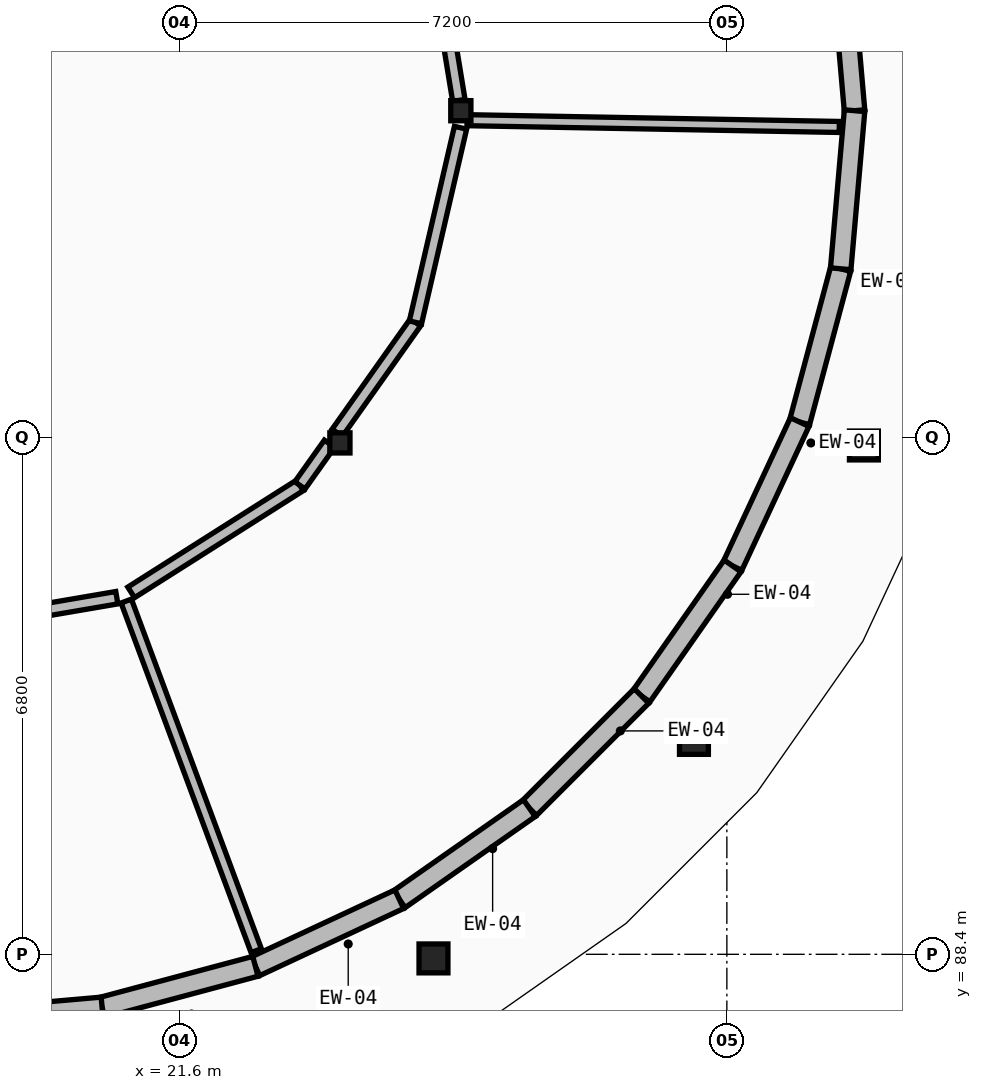
"""IFC4 building model, lengths in metres.
Left out: names, types, materials, properties, quantities, classifications, styles, units other than length and angle.
Written with IfcOpenShell. Run it as: python <this file> out.ifc"""

import sys

from ifc_helpers import new_model, si_unit, direction, frame, frame_2d, origin, origin_2d, place, context, subcontext, project, spatial, rectangle, circle, extrude, element, fill, save


model = new_model("IFC4")
c1 = context("Model", 3, precision=1e-05, world=origin(), true_north=direction((0.0, 1.0)))
c2 = subcontext(c1, "Body", "Model", "MODEL_VIEW")
j1 = project(units=[si_unit("LENGTHUNIT", "METRE"), si_unit("PLANEANGLEUNIT", "RADIAN")], contexts=[c1])
p1 = place(None, origin())
s1 = spatial("IfcSite", under=j1, at=p1, CompositionType="ELEMENT")
p2 = place(p1, origin())
s2 = spatial("IfcBuilding", under=s1, at=p2, CompositionType="ELEMENT")
p3 = place(p2, frame((0.0, 0.0, 21.35)))
s3 = spatial("IfcBuildingStorey", under=s2, at=p3, CompositionType="ELEMENT", Elevation=21.35)
for number, where, z_axis, x_axis in (
    (1, (24.94, 88.346, 0.0), (0.0, 0.0, 1.0), (1.0, 0.0, 0.0)),
    (2, (28.367, 91.221, 0.0), (0.0, 0.0, 1.0), (1.0, 0.0, 0.0)),
    (3, (30.603, 95.095, 0.0), (0.0, 0.0, 1.0), (1.0, 0.0, 0.0)),
):
    element("IfcColumn", number, at=place(p3, frame(where, z_axis=z_axis, x_axis=x_axis)), inside=s3, PredefinedType="PILASTER", context=c2, shape_type="SweptSolid", body=[
        extrude(circle(Radius=0.19, at=origin_2d()), origin(), (0.0, 0.0, 1.0), 4.2),
    ])
for number, where, z_axis, x_axis in (
    (4, (25.3, 99.5, 0.0), (0.0, 0.0, 1.0), (1.0, 0.0, 0.0)),
    (5, (23.709, 95.129, 0.0), (0.0, 0.0, 1.0), (1.0, 0.0, 0.0)),
):
    element("IfcColumn", number, at=place(p3, frame(where, z_axis=z_axis, x_axis=x_axis)), inside=s3, PredefinedType="COLUMN", context=c2, shape_type="SweptSolid", body=[
        extrude(rectangle(XDim=0.265, YDim=0.265, at=origin_2d()), origin(), (0.0, 0.0, 1.0), 4.2),
    ])
p4 = place(p3, frame((30.298, 97.42, 0.0), z_axis=(0.0, 0.0, 1.0), x_axis=(-0.258652308331, -0.965970487849, 0.0)))
e6 = element("IfcWall", 6, at=p4, inside=s3, PredefinedType="ELEMENTEDWALL", context=c2, shape_type="SweptSolid", body=[
    extrude(rectangle(XDim=2.088, YDim=0.27, at=frame_2d((1.044, 0.0))), origin(), (0.0, 0.0, 1.0), 3.314),
])
p5 = place(p4, frame((0.634, 0.0, 0.85)))
e7 = element("IfcOpeningElement", 7, at=p5, cuts=e6, PredefinedType="OPENING", context=c2, shape_type="SweptSolid", body=[
    extrude(rectangle(XDim=0.82, YDim=1.45, at=frame_2d((0.41, 0.725))), frame((0.0, 0.145, 0.0), z_axis=(0.0, -1.0, 0.0), x_axis=(1.0, 0.0, 0.0)), (0.0, 0.0, 1.0), 0.29),
])
p6 = place(p3, frame((29.758, 95.403, 0.0), z_axis=(0.0, 0.0, 1.0), x_axis=(-0.422738299131, -0.906251803004, 0.0)))
e8 = element("IfcWall", 8, at=p6, inside=s3, PredefinedType="ELEMENTEDWALL", context=c2, shape_type="SweptSolid", body=[
    extrude(rectangle(XDim=2.089, YDim=0.27, at=frame_2d((1.044, 0.0))), origin(), (0.0, 0.0, 1.0), 3.314),
])
p7 = place(p6, frame((0.634, 0.0, 0.85)))
e9 = element("IfcOpeningElement", 9, at=p7, cuts=e8, PredefinedType="OPENING", context=c2, shape_type="SweptSolid", body=[
    extrude(rectangle(XDim=0.82, YDim=1.45, at=frame_2d((0.41, 0.725))), frame((0.0, 0.145, 0.0), z_axis=(0.0, -1.0, 0.0), x_axis=(1.0, 0.0, 0.0)), (0.0, 0.0, 1.0), 0.29),
])
p8 = place(p3, frame((28.875, 93.51, 0.0), z_axis=(0.0, 0.0, 1.0), x_axis=(-0.573572167388, -0.819155033433, 0.0)))
e10 = element("IfcWall", 10, at=p8, inside=s3, PredefinedType="ELEMENTEDWALL", context=c2, shape_type="SweptSolid", body=[
    extrude(rectangle(XDim=2.089, YDim=0.27, at=frame_2d((1.044, 0.0))), origin(), (0.0, 0.0, 1.0), 3.314),
])
p9 = place(p8, frame((0.634, 0.0, 0.85)))
e11 = element("IfcOpeningElement", 11, at=p9, cuts=e10, PredefinedType="OPENING", context=c2, shape_type="SweptSolid", body=[
    extrude(rectangle(XDim=0.82, YDim=1.45, at=frame_2d((0.41, 0.725))), frame((0.0, 0.145, 0.0), z_axis=(0.0, -1.0, 0.0), x_axis=(1.0, 0.0, 0.0)), (0.0, 0.0, 1.0), 0.29),
])
p10 = place(p3, frame((27.677, 91.799, 0.0), z_axis=(0.0, 0.0, 1.0), x_axis=(-0.707106781187, -0.707106781187, 0.0)))
e12 = element("IfcWall", 12, at=p10, inside=s3, PredefinedType="ELEMENTEDWALL", context=c2, shape_type="SweptSolid", body=[
    extrude(rectangle(XDim=2.087, YDim=0.27, at=frame_2d((1.044, 0.0))), origin(), (0.0, 0.0, 1.0), 3.314),
])
p11 = place(p10, frame((0.634, 0.0, 0.85)))
e13 = element("IfcOpeningElement", 13, at=p11, cuts=e12, PredefinedType="OPENING", context=c2, shape_type="SweptSolid", body=[
    extrude(rectangle(XDim=0.82, YDim=1.45, at=frame_2d((0.41, 0.725))), frame((0.0, 0.145, 0.0), z_axis=(0.0, -1.0, 0.0), x_axis=(1.0, 0.0, 0.0)), (0.0, 0.0, 1.0), 0.29),
])
p12 = place(p3, frame((26.201, 90.323, 0.0), z_axis=(0.0, 0.0, 1.0), x_axis=(-0.819155033433, -0.573572167388, 0.0)))
e14 = element("IfcWall", 14, at=p12, inside=s3, PredefinedType="ELEMENTEDWALL", context=c2, shape_type="SweptSolid", body=[
    extrude(rectangle(XDim=2.089, YDim=0.27, at=frame_2d((1.044, 0.0))), origin(), (0.0, 0.0, 1.0), 3.314),
])
p13 = place(p12, frame((0.634, 0.0, 0.85)))
e15 = element("IfcOpeningElement", 15, at=p13, cuts=e14, PredefinedType="OPENING", context=c2, shape_type="SweptSolid", body=[
    extrude(rectangle(XDim=0.82, YDim=1.45, at=frame_2d((0.41, 0.725))), frame((0.0, 0.145, 0.0), z_axis=(0.0, -1.0, 0.0), x_axis=(1.0, 0.0, 0.0)), (0.0, 0.0, 1.0), 0.29),
])
p14 = place(p3, frame((24.49, 89.125, 0.0), z_axis=(0.0, 0.0, 1.0), x_axis=(-0.906251803004, -0.422738299131, 0.0)))
e16 = element("IfcWall", 16, at=p14, inside=s3, PredefinedType="ELEMENTEDWALL", context=c2, shape_type="SweptSolid", body=[
    extrude(rectangle(XDim=2.089, YDim=0.27, at=frame_2d((1.044, 0.0))), origin(), (0.0, 0.0, 1.0), 3.314),
])
p15 = place(p14, frame((0.634, 0.0, 0.85)))
e17 = element("IfcOpeningElement", 17, at=p15, cuts=e16, PredefinedType="OPENING", context=c2, shape_type="SweptSolid", body=[
    extrude(rectangle(XDim=0.82, YDim=1.45, at=frame_2d((0.41, 0.725))), frame((0.0, 0.145, 0.0), z_axis=(0.0, -1.0, 0.0), x_axis=(1.0, 0.0, 0.0)), (0.0, 0.0, 1.0), 0.29),
])
p16 = place(p3, frame((22.597, 88.242, 0.0), z_axis=(0.0, 0.0, 1.0), x_axis=(-0.965970487849, -0.258652308331, 0.0)))
e18 = element("IfcWall", 18, at=p16, inside=s3, PredefinedType="ELEMENTEDWALL", context=c2, shape_type="SweptSolid", body=[
    extrude(rectangle(XDim=2.088, YDim=0.27, at=frame_2d((1.044, 0.0))), origin(), (0.0, 0.0, 1.0), 3.314),
])
p17 = place(p16, frame((0.634, 0.0, 0.85)))
e19 = element("IfcOpeningElement", 19, at=p17, cuts=e18, PredefinedType="OPENING", context=c2, shape_type="SweptSolid", body=[
    extrude(rectangle(XDim=0.82, YDim=1.45, at=frame_2d((0.41, 0.725))), frame((0.0, 0.145, 0.0), z_axis=(0.0, -1.0, 0.0), x_axis=(1.0, 0.0, 0.0)), (0.0, 0.0, 1.0), 0.29),
])
p18 = place(p3, frame((20.58, 87.702, 0.0), z_axis=(0.0, 0.0, 1.0), x_axis=(-0.996198792396, -0.087108931964, 0.0)))
e20 = element("IfcWall", 20, at=p18, inside=s3, PredefinedType="ELEMENTEDWALL", context=c2, shape_type="SweptSolid", body=[
    extrude(rectangle(XDim=2.088, YDim=0.27, at=frame_2d((1.044, 0.0))), origin(), (0.0, 0.0, 1.0), 3.314),
])
p19 = place(p18, frame((0.619, 0.0, 0.85)))
e21 = element("IfcOpeningElement", 21, at=p19, cuts=e20, PredefinedType="OPENING", context=c2, shape_type="SweptSolid", body=[
    extrude(rectangle(XDim=0.85, YDim=1.5, at=frame_2d((0.425, 0.75))), frame((0.0, 0.145, 0.0), z_axis=(0.0, -1.0, 0.0), x_axis=(1.0, 0.0, 0.0)), (0.0, 0.0, 1.0), 0.29),
])
p20 = place(p3, frame((30.298, 101.58, 0.0), z_axis=(0.0, 0.0, 1.0), x_axis=(0.087108931964, -0.996198792396, 0.0)))
e22 = element("IfcWall", 22, at=p20, inside=s3, PredefinedType="ELEMENTEDWALL", context=c2, shape_type="SweptSolid", body=[
    extrude(rectangle(XDim=2.088, YDim=0.27, at=frame_2d((1.044, 0.0))), origin(), (0.0, 0.0, 1.0), 3.314),
])
p21 = place(p20, frame((0.504, 0.0, 0.85)))
e23 = element("IfcOpeningElement", 23, at=p21, cuts=e22, PredefinedType="OPENING", context=c2, shape_type="SweptSolid", body=[
    extrude(rectangle(XDim=1.08, YDim=1.8, at=frame_2d((0.54, 0.9))), frame((0.0, 0.145, 0.0), z_axis=(0.0, -1.0, 0.0), x_axis=(1.0, 0.0, 0.0)), (0.0, 0.0, 1.0), 0.29),
])
p22 = place(p3, frame((30.48, 99.5, 0.0), z_axis=(0.0, 0.0, 1.0), x_axis=(-0.087108931964, -0.996198792396, 0.0)))
e24 = element("IfcWall", 24, at=p22, inside=s3, PredefinedType="ELEMENTEDWALL", context=c2, shape_type="SweptSolid", body=[
    extrude(rectangle(XDim=2.088, YDim=0.27, at=frame_2d((1.044, 0.0))), origin(), (0.0, 0.0, 1.0), 3.314),
])
p23 = place(p22, frame((0.494, 0.0, 0.85)))
e25 = element("IfcOpeningElement", 25, at=p23, cuts=e24, PredefinedType="OPENING", context=c2, shape_type="SweptSolid", body=[
    extrude(rectangle(XDim=1.1, YDim=1.25, at=frame_2d((0.55, 0.625))), frame((0.0, 0.145, 0.0), z_axis=(0.0, -1.0, 0.0), x_axis=(1.0, 0.0, 0.0)), (0.0, 0.0, 1.0), 0.29),
])
p24 = place(p3, frame((20.898, 93.048, 0.0), z_axis=(0.0, 0.0, 1.0), x_axis=(0.348428829985, -0.937335239088, 0.0)))
e26 = element("IfcWall", 26, at=p24, inside=s3, PredefinedType="PARTITIONING", context=c2, shape_type="SweptSolid", body=[
    extrude(rectangle(XDim=4.908, YDim=0.145, at=frame_2d((2.454, 0.0))), origin(), (0.0, 0.0, 1.0), 3.279),
])
p25 = place(p3, frame((25.382, 99.375, 0.0), z_axis=(0.0, 0.0, 1.0), x_axis=(0.999834471554, -0.01819421588, 0.0)))
e27 = element("IfcWall", 27, at=p25, inside=s3, PredefinedType="PARTITIONING", context=c2, shape_type="SweptSolid", body=[
    extrude(rectangle(XDim=4.898, YDim=0.145, at=frame_2d((2.449, 0.0))), origin(), (0.0, 0.0, 1.0), 3.279),
])
p26 = place(p3, frame((19.756, 92.918, 0.0), z_axis=(0.0, 0.0, 1.0), x_axis=(0.98568855246, 0.168576622189, 0.0)))
e28 = element("IfcWall", 28, at=p26, inside=s3, PredefinedType="PARTITIONING", context=c2, shape_type="SweptSolid", body=[
    extrude(rectangle(XDim=1.033, YDim=0.165, at=frame_2d((0.516, 0.0))), origin(), (0.0, 0.0, 1.0), 3.279),
])
p27 = place(p3, frame((20.963, 93.162, 0.0), z_axis=(0.0, 0.0, 1.0), x_axis=(0.844505505294, 0.535546871457, 0.0)))
e29 = element("IfcWall", 29, at=p27, inside=s3, PredefinedType="PARTITIONING", context=c2, shape_type="SweptSolid", body=[
    extrude(rectangle(XDim=2.629, YDim=0.165, at=frame_2d((1.314, 0.0))), origin(), (0.0, 0.0, 1.0), 3.279),
])
p28 = place(p27, frame((0.804, 0.0, 0.0)))
e30 = element("IfcOpeningElement", 30, at=p28, cuts=e29, PredefinedType="OPENING", context=c2, shape_type="SweptSolid", body=[
    extrude(rectangle(XDim=1.02, YDim=2.26, at=frame_2d((0.51, 1.13))), frame((0.0, 0.093, 0.0), z_axis=(0.0, -1.0, 0.0), x_axis=(1.0, 0.0, 0.0)), (0.0, 0.0, 1.0), 0.185),
])
p29 = place(p3, frame((23.183, 94.57, 0.0), z_axis=(0.0, 0.0, 1.0), x_axis=(0.578863935342, 0.815424149974, 0.0)))
e31 = element("IfcWall", 31, at=p29, inside=s3, PredefinedType="PARTITIONING", context=c2, shape_type="SweptSolid", body=[
    extrude(rectangle(XDim=0.672, YDim=0.165, at=frame_2d((0.336, 0.0))), origin(), (0.0, 0.0, 1.0), 3.279),
])
p30 = place(p3, frame((23.674, 95.262, 0.0), z_axis=(0.0, 0.0, 1.0), x_axis=(0.577834707515, 0.816153815645, 0.0)))
e32 = element("IfcWall", 32, at=p30, inside=s3, PredefinedType="PARTITIONING", context=c2, shape_type="SweptSolid", body=[
    extrude(rectangle(XDim=1.781, YDim=0.165, at=frame_2d((0.89, 0.0))), origin(), (0.0, 0.0, 1.0), 3.279),
])
p31 = place(p3, frame((24.703, 96.715, 0.0), z_axis=(0.0, 0.0, 1.0), x_axis=(0.225605611858, 0.974218716664, 0.0)))
e33 = element("IfcWall", 33, at=p31, inside=s3, PredefinedType="PARTITIONING", context=c2, shape_type="SweptSolid", body=[
    extrude(rectangle(XDim=2.629, YDim=0.165, at=frame_2d((1.314, 0.0))), origin(), (0.0, 0.0, 1.0), 3.279),
])
p32 = place(p3, frame((25.274, 99.635, 0.0), z_axis=(0.0, 0.0, 1.0), x_axis=(-0.161857175328, 0.986814194666, 0.0)))
e34 = element("IfcWall", 34, at=p32, inside=s3, PredefinedType="PARTITIONING", context=c2, shape_type="SweptSolid", body=[
    extrude(rectangle(XDim=2.088, YDim=0.165, at=frame_2d((1.044, 0.0))), origin(), (0.0, 0.0, 1.0), 3.279),
])
p33 = place(p32, frame((0.514, 0.0, 0.0)))
e35 = element("IfcOpeningElement", 35, at=p33, cuts=e34, PredefinedType="OPENING", context=c2, shape_type="SweptSolid", body=[
    extrude(rectangle(XDim=1.06, YDim=2.26, at=frame_2d((0.53, 1.13))), frame((0.0, 0.093, 0.0), z_axis=(0.0, -1.0, 0.0), x_axis=(1.0, 0.0, 0.0)), (0.0, 0.0, 1.0), 0.185),
])
p34 = place(p5, origin())
e36 = element("IfcWindow", 36, at=p34, inside=s3, PartitioningType="SINGLE_PANEL", PredefinedType="WINDOW", context=c2, shape_type="SweptSolid", body=[
    extrude(rectangle(XDim=0.82, YDim=1.45, at=frame_2d((0.41, 0.725))), frame((0.0, 0.03, 0.0), z_axis=(0.0, -1.0, 0.0), x_axis=(1.0, 0.0, 0.0)), (0.0, 0.0, 1.0), 0.06),
])
fill(e7, e36)
p35 = place(p7, origin())
e37 = element("IfcWindow", 37, at=p35, inside=s3, PartitioningType="SINGLE_PANEL", PredefinedType="WINDOW", context=c2, shape_type="SweptSolid", body=[
    extrude(rectangle(XDim=0.82, YDim=1.45, at=frame_2d((0.41, 0.725))), frame((0.0, 0.03, 0.0), z_axis=(0.0, -1.0, 0.0), x_axis=(1.0, 0.0, 0.0)), (0.0, 0.0, 1.0), 0.06),
])
fill(e9, e37)
p36 = place(p9, origin())
e38 = element("IfcWindow", 38, at=p36, inside=s3, PartitioningType="SINGLE_PANEL", PredefinedType="WINDOW", context=c2, shape_type="SweptSolid", body=[
    extrude(rectangle(XDim=0.82, YDim=1.45, at=frame_2d((0.41, 0.725))), frame((0.0, 0.03, 0.0), z_axis=(0.0, -1.0, 0.0), x_axis=(1.0, 0.0, 0.0)), (0.0, 0.0, 1.0), 0.06),
])
fill(e11, e38)
p37 = place(p11, origin())
e39 = element("IfcWindow", 39, at=p37, inside=s3, PartitioningType="SINGLE_PANEL", PredefinedType="WINDOW", context=c2, shape_type="SweptSolid", body=[
    extrude(rectangle(XDim=0.82, YDim=1.45, at=frame_2d((0.41, 0.725))), frame((0.0, 0.03, 0.0), z_axis=(0.0, -1.0, 0.0), x_axis=(1.0, 0.0, 0.0)), (0.0, 0.0, 1.0), 0.06),
])
fill(e13, e39)
p38 = place(p13, origin())
e40 = element("IfcWindow", 40, at=p38, inside=s3, PartitioningType="SINGLE_PANEL", PredefinedType="WINDOW", context=c2, shape_type="SweptSolid", body=[
    extrude(rectangle(XDim=0.82, YDim=1.45, at=frame_2d((0.41, 0.725))), frame((0.0, 0.03, 0.0), z_axis=(0.0, -1.0, 0.0), x_axis=(1.0, 0.0, 0.0)), (0.0, 0.0, 1.0), 0.06),
])
fill(e15, e40)
p39 = place(p15, origin())
e41 = element("IfcWindow", 41, at=p39, inside=s3, PartitioningType="SINGLE_PANEL", PredefinedType="WINDOW", context=c2, shape_type="SweptSolid", body=[
    extrude(rectangle(XDim=0.82, YDim=1.45, at=frame_2d((0.41, 0.725))), frame((0.0, 0.03, 0.0), z_axis=(0.0, -1.0, 0.0), x_axis=(1.0, 0.0, 0.0)), (0.0, 0.0, 1.0), 0.06),
])
fill(e17, e41)
p40 = place(p17, origin())
e42 = element("IfcWindow", 42, at=p40, inside=s3, PartitioningType="SINGLE_PANEL", PredefinedType="WINDOW", context=c2, shape_type="SweptSolid", body=[
    extrude(rectangle(XDim=0.82, YDim=1.45, at=frame_2d((0.41, 0.725))), frame((0.0, 0.03, 0.0), z_axis=(0.0, -1.0, 0.0), x_axis=(1.0, 0.0, 0.0)), (0.0, 0.0, 1.0), 0.06),
])
fill(e19, e42)
p41 = place(p19, origin())
e43 = element("IfcWindow", 43, at=p41, inside=s3, PartitioningType="SINGLE_PANEL", PredefinedType="WINDOW", context=c2, shape_type="SweptSolid", body=[
    extrude(rectangle(XDim=0.85, YDim=1.5, at=frame_2d((0.425, 0.75))), frame((0.0, 0.03, 0.0), z_axis=(0.0, -1.0, 0.0), x_axis=(1.0, 0.0, 0.0)), (0.0, 0.0, 1.0), 0.06),
])
fill(e21, e43)
p42 = place(p21, origin())
e44 = element("IfcWindow", 44, at=p42, inside=s3, PartitioningType="SINGLE_PANEL", PredefinedType="WINDOW", context=c2, shape_type="SweptSolid", body=[
    extrude(rectangle(XDim=1.08, YDim=1.8, at=frame_2d((0.54, 0.9))), frame((0.0, 0.03, 0.0), z_axis=(0.0, -1.0, 0.0), x_axis=(1.0, 0.0, 0.0)), (0.0, 0.0, 1.0), 0.06),
])
fill(e23, e44)
p43 = place(p23, origin())
e45 = element("IfcWindow", 45, at=p43, inside=s3, PartitioningType="SINGLE_PANEL", PredefinedType="WINDOW", context=c2, shape_type="SweptSolid", body=[
    extrude(rectangle(XDim=1.1, YDim=1.25, at=frame_2d((0.55, 0.625))), frame((0.0, 0.03, 0.0), z_axis=(0.0, -1.0, 0.0), x_axis=(1.0, 0.0, 0.0)), (0.0, 0.0, 1.0), 0.06),
])
fill(e25, e45)
p44 = place(p28, origin())
e46 = element("IfcDoor", 46, at=p44, inside=s3, OperationType="SINGLE_SWING_LEFT", PredefinedType="DOOR", context=c2, shape_type="SweptSolid", body=[
    extrude(rectangle(XDim=1.02, YDim=2.26, at=frame_2d((0.51, 1.13))), frame((0.0, 0.025, 0.0), z_axis=(0.0, -1.0, 0.0), x_axis=(1.0, 0.0, 0.0)), (0.0, 0.0, 1.0), 0.05),
])
fill(e30, e46)
p45 = place(p33, origin())
e47 = element("IfcDoor", 47, at=p45, inside=s3, OperationType="SINGLE_SWING_RIGHT", PredefinedType="DOOR", context=c2, shape_type="SweptSolid", body=[
    extrude(rectangle(XDim=1.06, YDim=2.26, at=frame_2d((0.53, 1.13))), frame((0.0, 0.025, 0.0), z_axis=(0.0, -1.0, 0.0), x_axis=(1.0, 0.0, 0.0)), (0.0, 0.0, 1.0), 0.05),
])
fill(e35, e47)
save(model, sys.argv[1])
